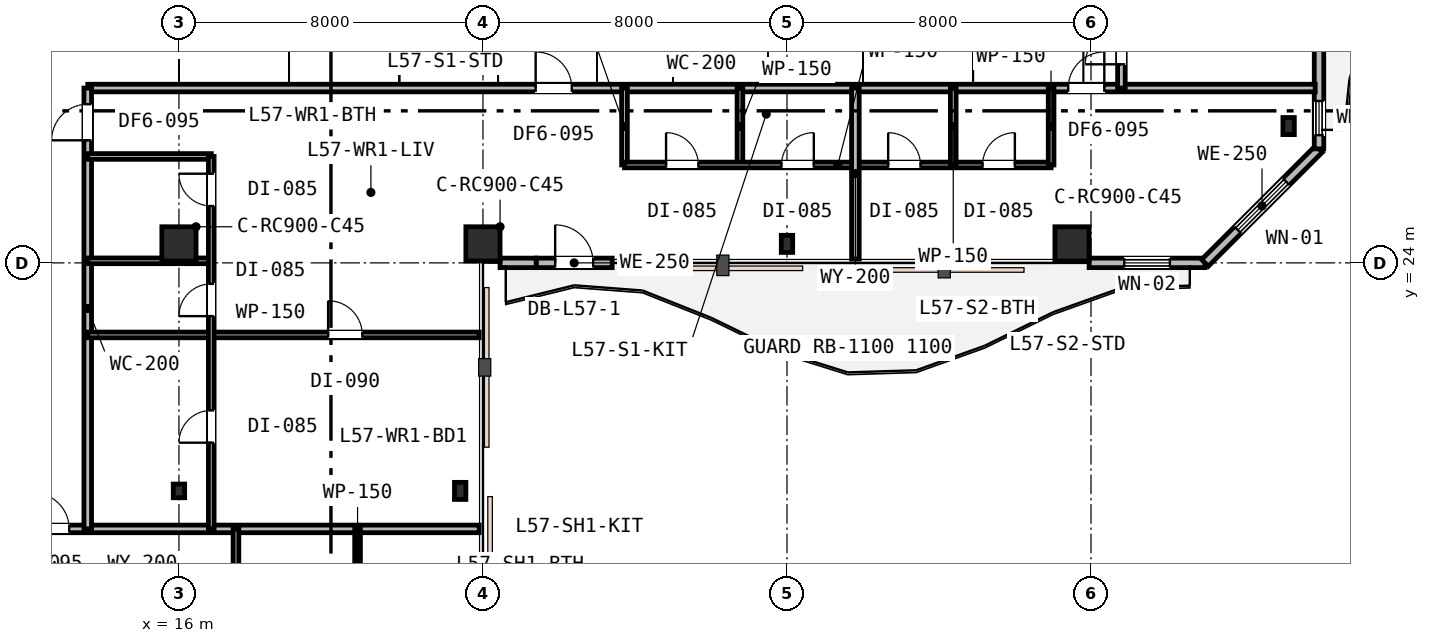
"""IFC4 building model, lengths in metres.
Left out: names, types, materials, properties, quantities, classifications, styles, units other than length and angle.
Written with IfcOpenShell. Run it as: python <this file> out.ifc"""

import sys

from ifc_helpers import new_model, si_unit, direction, frame, frame_2d, origin, origin_2d, place, context, subcontext, project, spatial, rectangle, i_section, extrude, element, fill, save


model = new_model("IFC4")
c1 = context("Model", 3, precision=1e-05, world=origin(), true_north=direction((0.0, 1.0)))
c2 = subcontext(c1, "Body", "Model", "MODEL_VIEW")
j1 = project(units=[si_unit("LENGTHUNIT", "METRE"), si_unit("PLANEANGLEUNIT", "RADIAN")], contexts=[c1])
p1 = place(None, origin())
s1 = spatial("IfcSite", under=j1, at=p1, CompositionType="ELEMENT")
p2 = place(p1, origin())
s2 = spatial("IfcBuilding", under=s1, at=p2, CompositionType="ELEMENT")
p3 = place(p2, frame((0.0, 0.0, 222.2)))
s3 = spatial("IfcBuildingStorey", under=s2, at=p3, CompositionType="ELEMENT", Elevation=222.2)
for number, where, z_axis, x_axis in (
    (1, (16.0, 24.5, 0.0), (0.0, 0.0, 1.0), (1.0, 0.0, 0.0)),
    (2, (24.0, 24.5, 0.0), (0.0, 0.0, 1.0), (1.0, 0.0, 0.0)),
):
    element("IfcColumn", number, at=place(p3, frame(where, z_axis=z_axis, x_axis=x_axis)), inside=s3, PredefinedType="COLUMN", context=c2, shape_type="SweptSolid", body=[
        extrude(rectangle(XDim=0.9, YDim=0.9, at=origin_2d()), origin(), (0.0, 0.0, 1.0), 3.8),
    ])
p4 = place(p3, frame((32.0, 24.5, 0.0), z_axis=(0.0, 0.0, 1.0), x_axis=(1.0, 0.0, 0.0)))
e3 = element("IfcColumn", 3, at=p4, inside=s3, PredefinedType="COLUMN", context=c2, shape_type="SweptSolid", body=[
    extrude(i_section(OverallWidth=0.3, OverallDepth=0.45, WebThickness=0.014, FlangeThickness=0.026, FilletRadius=0.027, at=origin_2d()), origin(), (0.0, 0.0, 1.0), 3.8),
])
p5 = place(p3, frame((39.5, 24.5, 0.0), z_axis=(0.0, 0.0, 1.0), x_axis=(1.0, 0.0, 0.0)))
e4 = element("IfcColumn", 4, at=p5, inside=s3, PredefinedType="COLUMN", context=c2, shape_type="SweptSolid", body=[
    extrude(rectangle(XDim=0.9, YDim=0.9, at=origin_2d()), origin(), (0.0, 0.0, 1.0), 3.8),
])
for number, where, z_axis, x_axis in (
    (5, (45.2, 27.6, 0.0), (0.0, 0.0, 1.0), (1.0, 0.0, 0.0)),
    (6, (23.4, 18.0, 0.0), (0.0, 0.0, 1.0), (1.0, 0.0, 0.0)),
):
    element("IfcColumn", number, at=place(p3, frame(where, z_axis=z_axis, x_axis=x_axis)), inside=s3, PredefinedType="COLUMN", context=c2, shape_type="SweptSolid", body=[
        extrude(i_section(OverallWidth=0.3, OverallDepth=0.45, WebThickness=0.014, FlangeThickness=0.026, FilletRadius=0.027, at=origin_2d()), origin(), (0.0, 0.0, 1.0), 3.8),
    ])
p6 = place(p3, frame((16.0, 18.0, 0.0), z_axis=(0.0, 0.0, 1.0), x_axis=(1.0, 0.0, 0.0)))
e7 = element("IfcColumn", 7, at=p6, inside=s3, PredefinedType="COLUMN", context=c2, shape_type="SweptSolid", body=[
    extrude(i_section(OverallWidth=0.3, OverallDepth=0.36, WebThickness=0.013, FlangeThickness=0.022, FilletRadius=0.027, at=origin_2d()), origin(), (0.0, 0.0, 1.0), 3.8),
])
p7 = place(p3, frame((25.4, 24.0, 0.0), z_axis=(0.0, 0.0, 1.0), x_axis=(1.0, 0.0, 0.0)))
e8 = element("IfcWall", 8, at=p7, inside=s3, PredefinedType="STANDARD", context=c2, shape_type="SweptSolid", body=[
    extrude(rectangle(XDim=2.0, YDim=0.25, at=frame_2d((1.0, 0.0))), origin(), (0.0, 0.0, 1.0), 3.24),
])
p8 = place(p7, frame((0.5, 0.0, 0.0)))
e9 = element("IfcOpeningElement", 9, at=p8, cuts=e8, PredefinedType="OPENING", context=c2, shape_type="SweptSolid", body=[
    extrude(rectangle(XDim=1.0, YDim=2.15, at=frame_2d((0.5, 1.075))), frame((0.0, 0.135, 0.0), z_axis=(0.0, -1.0, 0.0), x_axis=(1.0, 0.0, 0.0)), (0.0, 0.0, 1.0), 0.27),
])
p9 = place(p3, frame((24.45, 24.0, 0.0), z_axis=(0.0, 0.0, 1.0), x_axis=(1.0, 0.0, 0.0)))
e10 = element("IfcWall", 10, at=p9, inside=s3, PredefinedType="STANDARD", context=c2, shape_type="SweptSolid", body=[
    extrude(rectangle(XDim=0.95, YDim=0.25, at=frame_2d((0.475, 0.0))), origin(), (0.0, 0.0, 1.0), 3.24),
])
p10 = place(p3, frame((39.95, 24.0, 0.0), z_axis=(0.0, 0.0, 1.0), x_axis=(1.0, 0.0, 0.0)))
e11 = element("IfcWall", 11, at=p10, inside=s3, PredefinedType="STANDARD", context=c2, shape_type="SweptSolid", body=[
    extrude(rectangle(XDim=3.05, YDim=0.25, at=frame_2d((1.525, 0.0))), origin(), (0.0, 0.0, 1.0), 3.53),
])
p11 = place(p10, frame((0.925, 0.0, 0.85)))
e12 = element("IfcOpeningElement", 12, at=p11, cuts=e11, PredefinedType="OPENING", context=c2, shape_type="SweptSolid", body=[
    extrude(rectangle(XDim=1.2, YDim=1.6, at=frame_2d((0.6, 0.8))), frame((0.0, 0.135, 0.0), z_axis=(0.0, -1.0, 0.0), x_axis=(1.0, 0.0, 0.0)), (0.0, 0.0, 1.0), 0.27),
])
p12 = place(p3, frame((43.0, 24.0, 0.0), z_axis=(0.0, 0.0, 1.0), x_axis=(0.707106781187, 0.707106781187, 0.0)))
e13 = element("IfcWall", 13, at=p12, inside=s3, PredefinedType="STANDARD", context=c2, shape_type="SweptSolid", body=[
    extrude(rectangle(XDim=4.243, YDim=0.25, at=frame_2d((2.121, 0.0))), origin(), (0.0, 0.0, 1.0), 3.53),
])
p13 = place(p12, frame((1.221, 0.0, 0.75)))
e14 = element("IfcOpeningElement", 14, at=p13, cuts=e13, PredefinedType="OPENING", context=c2, shape_type="SweptSolid", body=[
    extrude(rectangle(XDim=1.8, YDim=1.85, at=frame_2d((0.9, 0.925))), frame((0.0, 0.135, 0.0), z_axis=(0.0, -1.0, 0.0), x_axis=(1.0, 0.0, 0.0)), (0.0, 0.0, 1.0), 0.27),
])
p14 = place(p3, frame((46.0, 27.0, 0.0), z_axis=(0.0, 0.0, 1.0), x_axis=(0.0, 1.0, 0.0)))
e15 = element("IfcWall", 15, at=p14, inside=s3, PredefinedType="STANDARD", context=c2, shape_type="SweptSolid", body=[
    extrude(rectangle(XDim=2.9, YDim=0.25, at=frame_2d((1.45, 0.0))), origin(), (0.0, 0.0, 1.0), 3.53),
])
p15 = place(p14, frame((0.36, 0.0, 0.9)))
e16 = element("IfcOpeningElement", 16, at=p15, cuts=e15, PredefinedType="OPENING", context=c2, shape_type="SweptSolid", body=[
    extrude(rectangle(XDim=0.9, YDim=1.55, at=frame_2d((0.45, 0.775))), frame((0.0, 0.135, 0.0), z_axis=(0.0, -1.0, 0.0), x_axis=(1.0, 0.0, 0.0)), (0.0, 0.0, 1.0), 0.27),
])
p16 = place(p3, frame((13.6, 28.6, 0.0), z_axis=(0.0, 0.0, 1.0), x_axis=(1.0, 0.0, 0.0)))
e17 = element("IfcWall", 17, at=p16, inside=s3, PredefinedType="PARTITIONING", context=c2, shape_type="SweptSolid", body=[
    extrude(rectangle(XDim=32.3, YDim=0.2, at=frame_2d((16.15, 0.0))), origin(), (0.0, 0.0, 1.0), 2.92),
])
p17 = place(p16, frame((11.787, 0.0, 0.0)))
e18 = element("IfcOpeningElement", 18, at=p17, cuts=e17, PredefinedType="OPENING", context=c2, shape_type="SweptSolid", body=[
    extrude(rectangle(XDim=0.95, YDim=2.15, at=frame_2d((0.475, 1.075))), frame((0.0, 0.11, 0.0), z_axis=(0.0, -1.0, 0.0), x_axis=(1.0, 0.0, 0.0)), (0.0, 0.0, 1.0), 0.22),
])
p18 = place(p16, frame((25.8, 0.0, 0.0)))
e19 = element("IfcOpeningElement", 19, at=p18, cuts=e17, PredefinedType="OPENING", context=c2, shape_type="SweptSolid", body=[
    extrude(rectangle(XDim=0.95, YDim=2.15, at=frame_2d((0.475, 1.075))), frame((0.0, 0.11, 0.0), z_axis=(0.0, -1.0, 0.0), x_axis=(1.0, 0.0, 0.0)), (0.0, 0.0, 1.0), 0.22),
])
p19 = place(p3, frame((40.8, 28.6, 0.0), z_axis=(0.0, 0.0, 1.0), x_axis=(0.0, 1.0, 0.0)))
e20 = element("IfcWall", 20, at=p19, inside=s3, PredefinedType="PARTITIONING", context=c2, shape_type="SweptSolid", body=[
    extrude(rectangle(XDim=14.3, YDim=0.2, at=frame_2d((7.15, 0.0))), origin(), (0.0, 0.0, 1.0), 2.92),
])
p20 = place(p19, frame((0.625, 0.0, 0.0)))
e21 = element("IfcOpeningElement", 21, at=p20, cuts=e20, PredefinedType="OPENING", context=c2, shape_type="SweptSolid", body=[
    extrude(rectangle(XDim=0.95, YDim=2.15, at=frame_2d((0.475, 1.075))), frame((0.0, 0.11, 0.0), z_axis=(0.0, -1.0, 0.0), x_axis=(1.0, 0.0, 0.0)), (0.0, 0.0, 1.0), 0.22),
])
for number, where, z_axis, x_axis in (
    (22, (27.724, 26.576, 0.0), (0.0, 0.0, 1.0), (0.0, 1.0, 0.0)),
    (23, (30.762, 26.576, 0.0), (0.0, 0.0, 1.0), (0.0, 1.0, 0.0)),
):
    element("IfcWall", number, at=place(p3, frame(where, z_axis=z_axis, x_axis=x_axis)), inside=s3, PredefinedType="PARTITIONING", context=c2, shape_type="SweptSolid", body=[
        extrude(rectangle(XDim=2.024, YDim=0.15, at=frame_2d((1.012, 0.0))), origin(), (0.0, 0.0, 1.0), 3.53),
    ])
p21 = place(p3, frame((27.724, 26.576, 0.0), z_axis=(0.0, 0.0, 1.0), x_axis=(1.0, 0.0, 0.0)))
e24 = element("IfcWall", 24, at=p21, inside=s3, PredefinedType="PARTITIONING", context=c2, shape_type="SweptSolid", body=[
    extrude(rectangle(XDim=11.226, YDim=0.15, at=frame_2d((5.613, 0.0))), origin(), (0.0, 0.0, 1.0), 2.92),
])
p22 = place(p21, frame((1.094, 0.0, 0.0)))
e25 = element("IfcOpeningElement", 25, at=p22, cuts=e24, PredefinedType="OPENING", context=c2, shape_type="SweptSolid", body=[
    extrude(rectangle(XDim=0.85, YDim=2.15, at=frame_2d((0.425, 1.075))), frame((0.0, 0.085, 0.0), z_axis=(0.0, -1.0, 0.0), x_axis=(1.0, 0.0, 0.0)), (0.0, 0.0, 1.0), 0.17),
])
p23 = place(p21, frame((4.132, 0.0, 0.0)))
e26 = element("IfcOpeningElement", 26, at=p23, cuts=e24, PredefinedType="OPENING", context=c2, shape_type="SweptSolid", body=[
    extrude(rectangle(XDim=0.85, YDim=2.15, at=frame_2d((0.425, 1.075))), frame((0.0, 0.085, 0.0), z_axis=(0.0, -1.0, 0.0), x_axis=(1.0, 0.0, 0.0)), (0.0, 0.0, 1.0), 0.17),
])
p24 = place(p21, frame((6.939, 0.0, 0.0)))
e27 = element("IfcOpeningElement", 27, at=p24, cuts=e24, PredefinedType="OPENING", context=c2, shape_type="SweptSolid", body=[
    extrude(rectangle(XDim=0.85, YDim=2.15, at=frame_2d((0.425, 1.075))), frame((0.0, 0.085, 0.0), z_axis=(0.0, -1.0, 0.0), x_axis=(1.0, 0.0, 0.0)), (0.0, 0.0, 1.0), 0.17),
])
p25 = place(p21, frame((9.422, 0.0, 0.0)))
e28 = element("IfcOpeningElement", 28, at=p25, cuts=e24, PredefinedType="OPENING", context=c2, shape_type="SweptSolid", body=[
    extrude(rectangle(XDim=0.85, YDim=2.15, at=frame_2d((0.425, 1.075))), frame((0.0, 0.085, 0.0), z_axis=(0.0, -1.0, 0.0), x_axis=(1.0, 0.0, 0.0)), (0.0, 0.0, 1.0), 0.17),
])
p26 = place(p3, frame((33.8, 24.1, 0.0), z_axis=(0.0, 0.0, 1.0), x_axis=(0.0, 1.0, 0.0)))
e29 = element("IfcWall", 29, at=p26, inside=s3, PredefinedType="PARTITIONING", context=c2, shape_type="SweptSolid", body=[
    extrude(rectangle(XDim=4.5, YDim=0.2, at=frame_2d((2.25, 0.0))), origin(), (0.0, 0.0, 1.0), 3.24),
])
p27 = place(p3, frame((38.95, 26.576, 0.0), z_axis=(0.0, 0.0, 1.0), x_axis=(0.0, 1.0, 0.0)))
e30 = element("IfcWall", 30, at=p27, inside=s3, PredefinedType="PARTITIONING", context=c2, shape_type="SweptSolid", body=[
    extrude(rectangle(XDim=2.024, YDim=0.15, at=frame_2d((1.012, 0.0))), origin(), (0.0, 0.0, 1.0), 2.92),
])
p28 = place(p3, frame((36.375, 26.576, 0.0), z_axis=(0.0, 0.0, 1.0), x_axis=(0.0, 1.0, 0.0)))
e31 = element("IfcWall", 31, at=p28, inside=s3, PredefinedType="PARTITIONING", context=c2, shape_type="SweptSolid", body=[
    extrude(rectangle(XDim=2.024, YDim=0.15, at=frame_2d((1.012, 0.0))), origin(), (0.0, 0.0, 1.0), 3.53),
])
p29 = place(p3, frame((5.1, 17.0, 0.0), z_axis=(0.0, 0.0, 1.0), x_axis=(1.0, 0.0, 0.0)))
e32 = element("IfcWall", 32, at=p29, inside=s3, PredefinedType="PARTITIONING", context=c2, shape_type="SweptSolid", body=[
    extrude(rectangle(XDim=18.8, YDim=0.2, at=frame_2d((9.4, 0.0))), origin(), (0.0, 0.0, 1.0), 2.92),
])
p30 = place(p29, frame((7.063, 0.0, 0.0)))
e33 = element("IfcOpeningElement", 33, at=p30, cuts=e32, PredefinedType="OPENING", context=c2, shape_type="SweptSolid", body=[
    extrude(rectangle(XDim=0.95, YDim=2.15, at=frame_2d((0.475, 1.075))), frame((0.0, 0.11, 0.0), z_axis=(0.0, -1.0, 0.0), x_axis=(1.0, 0.0, 0.0)), (0.0, 0.0, 1.0), 0.22),
])
p31 = place(p3, frame((13.6, 17.0, 0.0), z_axis=(0.0, 0.0, 1.0), x_axis=(0.0, 1.0, 0.0)))
e34 = element("IfcWall", 34, at=p31, inside=s3, PredefinedType="PARTITIONING", context=c2, shape_type="SweptSolid", body=[
    extrude(rectangle(XDim=11.6, YDim=0.2, at=frame_2d((5.8, 0.0))), origin(), (0.0, 0.0, 1.0), 2.92),
])
p32 = place(p31, frame((10.225, 0.0, 0.0)))
e35 = element("IfcOpeningElement", 35, at=p32, cuts=e34, PredefinedType="OPENING", context=c2, shape_type="SweptSolid", body=[
    extrude(rectangle(XDim=0.95, YDim=2.15, at=frame_2d((0.475, 1.075))), frame((0.0, 0.11, 0.0), z_axis=(0.0, -1.0, 0.0), x_axis=(1.0, 0.0, 0.0)), (0.0, 0.0, 1.0), 0.22),
])
p33 = place(p3, frame((13.6, 22.104, 0.0), z_axis=(0.0, 0.0, 1.0), x_axis=(1.0, 0.0, 0.0)))
e36 = element("IfcWall", 36, at=p33, inside=s3, PredefinedType="PARTITIONING", context=c2, shape_type="SweptSolid", body=[
    extrude(rectangle(XDim=10.3, YDim=0.15, at=frame_2d((5.15, 0.0))), origin(), (0.0, 0.0, 1.0), 2.92),
])
p34 = place(p33, frame((6.325, 0.0, 0.0)))
e37 = element("IfcOpeningElement", 37, at=p34, cuts=e36, PredefinedType="OPENING", context=c2, shape_type="SweptSolid", body=[
    extrude(rectangle(XDim=0.9, YDim=2.15, at=frame_2d((0.45, 1.075))), frame((0.0, 0.085, 0.0), z_axis=(0.0, -1.0, 0.0), x_axis=(1.0, 0.0, 0.0)), (0.0, 0.0, 1.0), 0.17),
])
for number, where, z_axis, x_axis in (
    (38, (13.6, 24.054, 0.0), (0.0, 0.0, 1.0), (1.0, 0.0, 0.0)),
    (39, (13.6, 26.8, 0.0), (0.0, 0.0, 1.0), (1.0, 0.0, 0.0)),
):
    element("IfcWall", number, at=place(p3, frame(where, z_axis=z_axis, x_axis=x_axis)), inside=s3, PredefinedType="PARTITIONING", context=c2, shape_type="SweptSolid", body=[
        extrude(rectangle(XDim=3.25, YDim=0.15, at=frame_2d((1.625, 0.0))), origin(), (0.0, 0.0, 1.0), 2.92),
    ])
p35 = place(p3, frame((16.85, 17.0, 0.0), z_axis=(0.0, 0.0, 1.0), x_axis=(0.0, 1.0, 0.0)))
e40 = element("IfcWall", 40, at=p35, inside=s3, PredefinedType="PARTITIONING", context=c2, shape_type="SweptSolid", body=[
    extrude(rectangle(XDim=9.8, YDim=0.15, at=frame_2d((4.9, 0.0))), origin(), (0.0, 0.0, 1.0), 2.92),
])
p36 = place(p35, frame((5.598, 0.0, 0.0)))
e41 = element("IfcOpeningElement", 41, at=p36, cuts=e40, PredefinedType="OPENING", context=c2, shape_type="SweptSolid", body=[
    extrude(rectangle(XDim=0.85, YDim=2.15, at=frame_2d((0.425, 1.075))), frame((0.0, 0.085, 0.0), z_axis=(0.0, -1.0, 0.0), x_axis=(1.0, 0.0, 0.0)), (0.0, 0.0, 1.0), 0.17),
])
p37 = place(p35, frame((8.496, 0.0, 0.0)))
e42 = element("IfcOpeningElement", 42, at=p37, cuts=e40, PredefinedType="OPENING", context=c2, shape_type="SweptSolid", body=[
    extrude(rectangle(XDim=0.85, YDim=2.15, at=frame_2d((0.425, 1.075))), frame((0.0, 0.085, 0.0), z_axis=(0.0, -1.0, 0.0), x_axis=(1.0, 0.0, 0.0)), (0.0, 0.0, 1.0), 0.17),
])
p38 = place(p35, frame((2.268, 0.0, 0.0)))
e43 = element("IfcOpeningElement", 43, at=p38, cuts=e40, PredefinedType="OPENING", context=c2, shape_type="SweptSolid", body=[
    extrude(rectangle(XDim=0.85, YDim=2.15, at=frame_2d((0.425, 1.075))), frame((0.0, 0.085, 0.0), z_axis=(0.0, -1.0, 0.0), x_axis=(1.0, 0.0, 0.0)), (0.0, 0.0, 1.0), 0.17),
])
p39 = place(p3, frame((17.5, 14.65, 0.0), z_axis=(0.0, 0.0, 1.0), x_axis=(0.0, 1.0, 0.0)))
e44 = element("IfcWall", 44, at=p39, inside=s3, PredefinedType="PARTITIONING", context=c2, shape_type="SweptSolid", body=[
    extrude(rectangle(XDim=2.35, YDim=0.15, at=frame_2d((1.175, 0.0))), origin(), (0.0, 0.0, 1.0), 3.53),
])
p40 = place(p3, frame((20.7, 14.65, 0.0), z_axis=(0.0, 0.0, 1.0), x_axis=(0.0, 1.0, 0.0)))
e45 = element("IfcWall", 45, at=p40, inside=s3, PredefinedType="PARTITIONING", context=c2, shape_type="SweptSolid", body=[
    extrude(rectangle(XDim=2.35, YDim=0.15, at=frame_2d((1.175, 0.0))), origin(), (0.0, 0.0, 1.0), 3.22),
])
p41 = place(p8, origin())
e46 = element("IfcDoor", 46, at=p41, inside=s3, OperationType="SINGLE_SWING_LEFT", PredefinedType="DOOR", context=c2, shape_type="SweptSolid", body=[
    extrude(rectangle(XDim=1.0, YDim=2.15, at=frame_2d((0.5, 1.075))), frame((0.0, 0.025, 0.0), z_axis=(0.0, -1.0, 0.0), x_axis=(1.0, 0.0, 0.0)), (0.0, 0.0, 1.0), 0.05),
])
fill(e9, e46)
p42 = place(p11, origin())
e47 = element("IfcWindow", 47, at=p42, inside=s3, PartitioningType="SINGLE_PANEL", PredefinedType="WINDOW", context=c2, shape_type="SweptSolid", body=[
    extrude(rectangle(XDim=1.2, YDim=1.6, at=frame_2d((0.6, 0.8))), frame((0.0, 0.03, 0.0), z_axis=(0.0, -1.0, 0.0), x_axis=(1.0, 0.0, 0.0)), (0.0, 0.0, 1.0), 0.06),
])
fill(e12, e47)
p43 = place(p13, origin())
e48 = element("IfcWindow", 48, at=p43, inside=s3, PartitioningType="SINGLE_PANEL", PredefinedType="WINDOW", context=c2, shape_type="SweptSolid", body=[
    extrude(rectangle(XDim=1.8, YDim=1.85, at=frame_2d((0.9, 0.925))), frame((0.0, 0.03, 0.0), z_axis=(0.0, -1.0, 0.0), x_axis=(1.0, 0.0, 0.0)), (0.0, 0.0, 1.0), 0.06),
])
fill(e14, e48)
p44 = place(p15, origin())
e49 = element("IfcWindow", 49, at=p44, inside=s3, PartitioningType="SINGLE_PANEL", PredefinedType="WINDOW", context=c2, shape_type="SweptSolid", body=[
    extrude(rectangle(XDim=0.9, YDim=1.55, at=frame_2d((0.45, 0.775))), frame((0.0, 0.03, 0.0), z_axis=(0.0, -1.0, 0.0), x_axis=(1.0, 0.0, 0.0)), (0.0, 0.0, 1.0), 0.06),
])
fill(e16, e49)
p45 = place(p20, origin())
e50 = element("IfcDoor", 50, at=p45, inside=s3, OperationType="SINGLE_SWING_LEFT", PredefinedType="DOOR", context=c2, shape_type="SweptSolid", body=[
    extrude(rectangle(XDim=0.95, YDim=2.15, at=frame_2d((0.475, 1.075))), frame((0.0, 0.025, 0.0), z_axis=(0.0, -1.0, 0.0), x_axis=(1.0, 0.0, 0.0)), (0.0, 0.0, 1.0), 0.05),
])
fill(e21, e50)
p46 = place(p17, origin())
e51 = element("IfcDoor", 51, at=p46, inside=s3, OperationType="SINGLE_SWING_LEFT", PredefinedType="DOOR", context=c2, shape_type="SweptSolid", body=[
    extrude(rectangle(XDim=0.95, YDim=2.15, at=frame_2d((0.475, 1.075))), frame((0.0, 0.025, 0.0), z_axis=(0.0, -1.0, 0.0), x_axis=(1.0, 0.0, 0.0)), (0.0, 0.0, 1.0), 0.05),
])
fill(e18, e51)
p47 = place(p22, origin())
e52 = element("IfcDoor", 52, at=p47, inside=s3, OperationType="SINGLE_SWING_LEFT", PredefinedType="DOOR", context=c2, shape_type="SweptSolid", body=[
    extrude(rectangle(XDim=0.85, YDim=2.15, at=frame_2d((0.425, 1.075))), frame((0.0, 0.025, 0.0), z_axis=(0.0, -1.0, 0.0), x_axis=(1.0, 0.0, 0.0)), (0.0, 0.0, 1.0), 0.05),
])
fill(e25, e52)
p48 = place(p23, origin())
e53 = element("IfcDoor", 53, at=p48, inside=s3, OperationType="SINGLE_SWING_RIGHT", PredefinedType="DOOR", context=c2, shape_type="SweptSolid", body=[
    extrude(rectangle(XDim=0.85, YDim=2.15, at=frame_2d((0.425, 1.075))), frame((0.0, 0.025, 0.0), z_axis=(0.0, -1.0, 0.0), x_axis=(1.0, 0.0, 0.0)), (0.0, 0.0, 1.0), 0.05),
])
fill(e26, e53)
p49 = place(p18, origin())
e54 = element("IfcDoor", 54, at=p49, inside=s3, OperationType="SINGLE_SWING_RIGHT", PredefinedType="DOOR", context=c2, shape_type="SweptSolid", body=[
    extrude(rectangle(XDim=0.95, YDim=2.15, at=frame_2d((0.475, 1.075))), frame((0.0, 0.025, 0.0), z_axis=(0.0, -1.0, 0.0), x_axis=(1.0, 0.0, 0.0)), (0.0, 0.0, 1.0), 0.05),
])
fill(e19, e54)
p50 = place(p24, origin())
e55 = element("IfcDoor", 55, at=p50, inside=s3, OperationType="SINGLE_SWING_LEFT", PredefinedType="DOOR", context=c2, shape_type="SweptSolid", body=[
    extrude(rectangle(XDim=0.85, YDim=2.15, at=frame_2d((0.425, 1.075))), frame((0.0, 0.025, 0.0), z_axis=(0.0, -1.0, 0.0), x_axis=(1.0, 0.0, 0.0)), (0.0, 0.0, 1.0), 0.05),
])
fill(e27, e55)
p51 = place(p25, origin())
e56 = element("IfcDoor", 56, at=p51, inside=s3, OperationType="SINGLE_SWING_RIGHT", PredefinedType="DOOR", context=c2, shape_type="SweptSolid", body=[
    extrude(rectangle(XDim=0.85, YDim=2.15, at=frame_2d((0.425, 1.075))), frame((0.0, 0.025, 0.0), z_axis=(0.0, -1.0, 0.0), x_axis=(1.0, 0.0, 0.0)), (0.0, 0.0, 1.0), 0.05),
])
fill(e28, e56)
p52 = place(p32, origin())
e57 = element("IfcDoor", 57, at=p52, inside=s3, OperationType="SINGLE_SWING_LEFT", PredefinedType="DOOR", context=c2, shape_type="SweptSolid", body=[
    extrude(rectangle(XDim=0.95, YDim=2.15, at=frame_2d((0.475, 1.075))), frame((0.0, 0.025, 0.0), z_axis=(0.0, -1.0, 0.0), x_axis=(1.0, 0.0, 0.0)), (0.0, 0.0, 1.0), 0.05),
])
fill(e35, e57)
p53 = place(p36, origin())
e58 = element("IfcDoor", 58, at=p53, inside=s3, OperationType="SINGLE_SWING_LEFT", PredefinedType="DOOR", context=c2, shape_type="SweptSolid", body=[
    extrude(rectangle(XDim=0.85, YDim=2.15, at=frame_2d((0.425, 1.075))), frame((0.0, 0.025, 0.0), z_axis=(0.0, -1.0, 0.0), x_axis=(1.0, 0.0, 0.0)), (0.0, 0.0, 1.0), 0.05),
])
fill(e41, e58)
p54 = place(p37, origin())
e59 = element("IfcDoor", 59, at=p54, inside=s3, OperationType="SINGLE_SWING_RIGHT", PredefinedType="DOOR", context=c2, shape_type="SweptSolid", body=[
    extrude(rectangle(XDim=0.85, YDim=2.15, at=frame_2d((0.425, 1.075))), frame((0.0, 0.025, 0.0), z_axis=(0.0, -1.0, 0.0), x_axis=(1.0, 0.0, 0.0)), (0.0, 0.0, 1.0), 0.05),
])
fill(e42, e59)
p55 = place(p38, origin())
e60 = element("IfcDoor", 60, at=p55, inside=s3, OperationType="SINGLE_SWING_LEFT", PredefinedType="DOOR", context=c2, shape_type="SweptSolid", body=[
    extrude(rectangle(XDim=0.85, YDim=2.15, at=frame_2d((0.425, 1.075))), frame((0.0, 0.025, 0.0), z_axis=(0.0, -1.0, 0.0), x_axis=(1.0, 0.0, 0.0)), (0.0, 0.0, 1.0), 0.05),
])
fill(e43, e60)
p56 = place(p34, origin())
e61 = element("IfcDoor", 61, at=p56, inside=s3, OperationType="SINGLE_SWING_LEFT", PredefinedType="DOOR", context=c2, shape_type="SweptSolid", body=[
    extrude(rectangle(XDim=0.9, YDim=2.15, at=frame_2d((0.45, 1.075))), frame((0.0, 0.025, 0.0), z_axis=(0.0, -1.0, 0.0), x_axis=(1.0, 0.0, 0.0)), (0.0, 0.0, 1.0), 0.05),
])
fill(e37, e61)
p57 = place(p30, origin())
e62 = element("IfcDoor", 62, at=p57, inside=s3, OperationType="SINGLE_SWING_LEFT", PredefinedType="DOOR", context=c2, shape_type="SweptSolid", body=[
    extrude(rectangle(XDim=0.95, YDim=2.15, at=frame_2d((0.475, 1.075))), frame((0.0, 0.025, 0.0), z_axis=(0.0, -1.0, 0.0), x_axis=(1.0, 0.0, 0.0)), (0.0, 0.0, 1.0), 0.05),
])
fill(e33, e62)
save(model, sys.argv[1])
